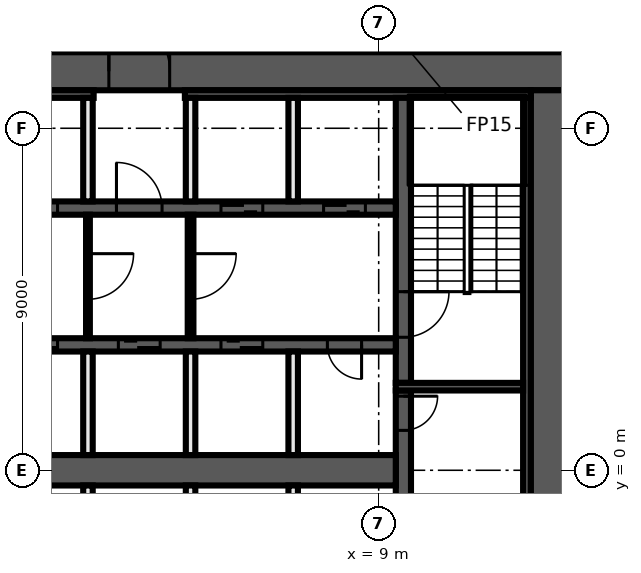
"""IFC4 building model, lengths in metres.
Left out: names, types, materials, properties, quantities, classifications, styles, units other than length and angle.
Written with IfcOpenShell. Run it as: python <this file> out.ifc"""

import sys

from ifc_helpers import new_model, si_unit, direction, frame, frame_2d, origin, place, context, subcontext, project, spatial, rectangle, extrude, element, fill, save


model = new_model("IFC4")
c1 = context("Model", 3, precision=1e-05, world=origin(), true_north=direction((0.0, 1.0)))
c2 = subcontext(c1, "Body", "Model", "MODEL_VIEW")
j1 = project(units=[si_unit("LENGTHUNIT", "METRE"), si_unit("PLANEANGLEUNIT", "RADIAN")], contexts=[c1])
p1 = place(None, origin())
s1 = spatial("IfcSite", under=j1, at=p1, CompositionType="ELEMENT")
p2 = place(p1, origin())
s2 = spatial("IfcBuilding", under=s1, at=p2, CompositionType="ELEMENT")
p3 = place(p2, frame((0.0, 0.0, 106.3)))
s3 = spatial("IfcBuildingStorey", under=s2, at=p3, CompositionType="ELEMENT", Elevation=106.3)
p4 = place(p3, frame((-14.0, 10.5, 0.0), z_axis=(0.0, 0.0, 1.0), x_axis=(1.0, 0.0, 0.0)))
e1 = element("IfcWall", 1, at=p4, inside=s3, PredefinedType="SHEAR", context=c2, shape_type="SweptSolid", body=[
    extrude(rectangle(XDim=28.0, YDim=1.0, at=frame_2d((14.0, 0.0))), origin(), (0.0, 0.0, 1.0), 3.3),
])
p5 = place(p4, frame((15.9, 0.0, 0.0)))
e2 = element("IfcOpeningElement", 2, at=p5, cuts=e1, PredefinedType="OPENING", context=c2, shape_type="SweptSolid", body=[
    extrude(rectangle(XDim=1.6, YDim=2.1, at=frame_2d((0.8, 1.05))), frame((0.0, 0.51, 0.0), z_axis=(0.0, -1.0, 0.0), x_axis=(1.0, 0.0, 0.0)), (0.0, 0.0, 1.0), 1.02),
])
p6 = place(p3, frame((13.5, 10.0, 0.0), z_axis=(0.0, 0.0, 1.0), x_axis=(0.0, -1.0, 0.0)))
e3 = element("IfcWall", 3, at=p6, inside=s3, PredefinedType="SHEAR", context=c2, shape_type="SweptSolid", body=[
    extrude(rectangle(XDim=20.0, YDim=1.0, at=frame_2d((10.0, 0.0))), origin(), (0.0, 0.0, 1.0), 3.3),
])
p7 = place(p3, frame((-13.0, 9.9, 0.0), z_axis=(0.0, 0.0, 1.0), x_axis=(1.0, 0.0, 0.0)))
e4 = element("IfcWall", 4, at=p7, inside=s3, PredefinedType="SHEAR", context=c2, shape_type="SweptSolid", body=[
    extrude(rectangle(XDim=14.5, YDim=0.2, at=frame_2d((7.25, 0.0))), origin(), (0.0, 0.0, 1.0), 3.3),
])
p8 = place(p3, frame((3.9, 9.9, 0.0), z_axis=(0.0, 0.0, 1.0), x_axis=(1.0, 0.0, 0.0)))
e5 = element("IfcWall", 5, at=p8, inside=s3, PredefinedType="SHEAR", context=c2, shape_type="SweptSolid", body=[
    extrude(rectangle(XDim=9.1, YDim=0.2, at=frame_2d((4.55, 0.0))), origin(), (0.0, 0.0, 1.0), 3.3),
])
p9 = place(p3, frame((12.9, 9.8, 0.0), z_axis=(0.0, 0.0, 1.0), x_axis=(0.0, -1.0, 0.0)))
e6 = element("IfcWall", 6, at=p9, inside=s3, PredefinedType="SHEAR", context=c2, shape_type="SweptSolid", body=[
    extrude(rectangle(XDim=19.6, YDim=0.2, at=frame_2d((9.8, 0.0))), origin(), (0.0, 0.0, 1.0), 3.3),
])
p10 = place(p3, frame((9.65, 2.1, 0.0), z_axis=(0.0, 0.0, 1.0), x_axis=(0.0, -1.0, 0.0)))
e7 = element("IfcWall", 7, at=p10, inside=s3, PredefinedType="SHEAR", context=c2, shape_type="SweptSolid", body=[
    extrude(rectangle(XDim=4.2, YDim=0.4, at=frame_2d((2.1, 0.0))), origin(), (0.0, 0.0, 1.0), 3.3),
])
p11 = place(p10, frame((0.15, 0.0, 0.0)))
e8 = element("IfcOpeningElement", 8, at=p11, cuts=e7, PredefinedType="OPENING", context=c2, shape_type="SweptSolid", body=[
    extrude(rectangle(XDim=0.9, YDim=2.1, at=frame_2d((0.45, 1.05))), frame((0.0, 0.21, 0.0), z_axis=(0.0, -1.0, 0.0), x_axis=(1.0, 0.0, 0.0)), (0.0, 0.0, 1.0), 0.42),
])
p12 = place(p3, frame((9.65, 9.8, 0.0), z_axis=(0.0, 0.0, 1.0), x_axis=(0.0, -1.0, 0.0)))
e9 = element("IfcWall", 9, at=p12, inside=s3, PredefinedType="SHEAR", context=c2, shape_type="SweptSolid", body=[
    extrude(rectangle(XDim=7.5, YDim=0.4, at=frame_2d((3.75, 0.0))), origin(), (0.0, 0.0, 1.0), 3.3),
])
p13 = place(p12, frame((5.1, 0.0, 0.0)))
e10 = element("IfcOpeningElement", 10, at=p13, cuts=e9, PredefinedType="OPENING", context=c2, shape_type="SweptSolid", body=[
    extrude(rectangle(XDim=1.2, YDim=2.1, at=frame_2d((0.6, 1.05))), frame((0.0, 0.21, 0.0), z_axis=(0.0, -1.0, 0.0), x_axis=(1.0, 0.0, 0.0)), (0.0, 0.0, 1.0), 0.42),
])
p14 = place(p3, frame((9.45, 2.2, 0.0), z_axis=(0.0, 0.0, 1.0), x_axis=(1.0, 0.0, 0.0)))
e11 = element("IfcWall", 11, at=p14, inside=s3, PredefinedType="SHEAR", context=c2, shape_type="SweptSolid", body=[
    extrude(rectangle(XDim=3.35, YDim=0.2, at=frame_2d((1.675, 0.0))), origin(), (0.0, 0.0, 1.0), 3.3),
])
p15 = place(p3, frame((-9.45, 6.9, 0.0), z_axis=(0.0, 0.0, 1.0), x_axis=(1.0, 0.0, 0.0)))
e12 = element("IfcWall", 12, at=p15, inside=s3, PredefinedType="SHEAR", context=c2, shape_type="SweptSolid", body=[
    extrude(rectangle(XDim=18.9, YDim=0.35, at=frame_2d((9.45, 0.0))), origin(), (0.0, 0.0, 1.0), 3.3),
])
p16 = place(p15, frame((0.8, 0.0, 0.0)))
e13 = element("IfcOpeningElement", 13, at=p16, cuts=e12, PredefinedType="OPENING", context=c2, shape_type="SweptSolid", body=[
    extrude(rectangle(XDim=1.1, YDim=2.1, at=frame_2d((0.55, 1.05))), frame((0.0, 0.185, 0.0), z_axis=(0.0, -1.0, 0.0), x_axis=(1.0, 0.0, 0.0)), (0.0, 0.0, 1.0), 0.37),
])
p17 = place(p15, frame((3.5, 0.0, 0.0)))
e14 = element("IfcOpeningElement", 14, at=p17, cuts=e12, PredefinedType="OPENING", context=c2, shape_type="SweptSolid", body=[
    extrude(rectangle(XDim=1.1, YDim=2.1, at=frame_2d((0.55, 1.05))), frame((0.0, 0.185, 0.0), z_axis=(0.0, -1.0, 0.0), x_axis=(1.0, 0.0, 0.0)), (0.0, 0.0, 1.0), 0.37),
])
p18 = place(p15, frame((6.2, 0.0, 0.0)))
e15 = element("IfcOpeningElement", 15, at=p18, cuts=e12, PredefinedType="OPENING", context=c2, shape_type="SweptSolid", body=[
    extrude(rectangle(XDim=1.1, YDim=2.1, at=frame_2d((0.55, 1.05))), frame((0.0, 0.185, 0.0), z_axis=(0.0, -1.0, 0.0), x_axis=(1.0, 0.0, 0.0)), (0.0, 0.0, 1.0), 0.37),
])
p19 = place(p15, frame((8.9, 0.0, 0.0)))
e16 = element("IfcOpeningElement", 16, at=p19, cuts=e12, PredefinedType="OPENING", context=c2, shape_type="SweptSolid", body=[
    extrude(rectangle(XDim=1.1, YDim=2.1, at=frame_2d((0.55, 1.05))), frame((0.0, 0.185, 0.0), z_axis=(0.0, -1.0, 0.0), x_axis=(1.0, 0.0, 0.0)), (0.0, 0.0, 1.0), 0.37),
])
p20 = place(p15, frame((11.55, 0.0, 0.0)))
e17 = element("IfcOpeningElement", 17, at=p20, cuts=e12, PredefinedType="OPENING", context=c2, shape_type="SweptSolid", body=[
    extrude(rectangle(XDim=1.2, YDim=2.1, at=frame_2d((0.6, 1.05))), frame((0.0, 0.185, 0.0), z_axis=(0.0, -1.0, 0.0), x_axis=(1.0, 0.0, 0.0)), (0.0, 0.0, 1.0), 0.37),
])
p21 = place(p15, frame((14.3, 0.0, 0.0)))
e18 = element("IfcOpeningElement", 18, at=p21, cuts=e12, PredefinedType="OPENING", context=c2, shape_type="SweptSolid", body=[
    extrude(rectangle(XDim=1.1, YDim=2.1, at=frame_2d((0.55, 1.05))), frame((0.0, 0.185, 0.0), z_axis=(0.0, -1.0, 0.0), x_axis=(1.0, 0.0, 0.0)), (0.0, 0.0, 1.0), 0.37),
])
p22 = place(p15, frame((17.0, 0.0, 0.0)))
e19 = element("IfcOpeningElement", 19, at=p22, cuts=e12, PredefinedType="OPENING", context=c2, shape_type="SweptSolid", body=[
    extrude(rectangle(XDim=1.1, YDim=2.1, at=frame_2d((0.55, 1.05))), frame((0.0, 0.185, 0.0), z_axis=(0.0, -1.0, 0.0), x_axis=(1.0, 0.0, 0.0)), (0.0, 0.0, 1.0), 0.37),
])
p23 = place(p3, frame((9.45, 3.3, 0.0), z_axis=(0.0, 0.0, 1.0), x_axis=(-1.0, 0.0, 0.0)))
e20 = element("IfcWall", 20, at=p23, inside=s3, PredefinedType="SHEAR", context=c2, shape_type="SweptSolid", body=[
    extrude(rectangle(XDim=18.9, YDim=0.35, at=frame_2d((9.45, 0.0))), origin(), (0.0, 0.0, 1.0), 3.3),
])
p24 = place(p23, frame((17.0, 0.0, 0.0)))
e21 = element("IfcOpeningElement", 21, at=p24, cuts=e20, PredefinedType="OPENING", context=c2, shape_type="SweptSolid", body=[
    extrude(rectangle(XDim=1.1, YDim=2.1, at=frame_2d((0.55, 1.05))), frame((0.0, 0.185, 0.0), z_axis=(0.0, -1.0, 0.0), x_axis=(1.0, 0.0, 0.0)), (0.0, 0.0, 1.0), 0.37),
])
p25 = place(p23, frame((14.3, 0.0, 0.0)))
e22 = element("IfcOpeningElement", 22, at=p25, cuts=e20, PredefinedType="OPENING", context=c2, shape_type="SweptSolid", body=[
    extrude(rectangle(XDim=1.1, YDim=2.1, at=frame_2d((0.55, 1.05))), frame((0.0, 0.185, 0.0), z_axis=(0.0, -1.0, 0.0), x_axis=(1.0, 0.0, 0.0)), (0.0, 0.0, 1.0), 0.37),
])
p26 = place(p23, frame((11.6, 0.0, 0.0)))
e23 = element("IfcOpeningElement", 23, at=p26, cuts=e20, PredefinedType="OPENING", context=c2, shape_type="SweptSolid", body=[
    extrude(rectangle(XDim=1.1, YDim=2.1, at=frame_2d((0.55, 1.05))), frame((0.0, 0.185, 0.0), z_axis=(0.0, -1.0, 0.0), x_axis=(1.0, 0.0, 0.0)), (0.0, 0.0, 1.0), 0.37),
])
p27 = place(p23, frame((8.9, 0.0, 0.0)))
e24 = element("IfcOpeningElement", 24, at=p27, cuts=e20, PredefinedType="OPENING", context=c2, shape_type="SweptSolid", body=[
    extrude(rectangle(XDim=1.1, YDim=2.1, at=frame_2d((0.55, 1.05))), frame((0.0, 0.185, 0.0), z_axis=(0.0, -1.0, 0.0), x_axis=(1.0, 0.0, 0.0)), (0.0, 0.0, 1.0), 0.37),
])
p28 = place(p23, frame((6.2, 0.0, 0.0)))
e25 = element("IfcOpeningElement", 25, at=p28, cuts=e20, PredefinedType="OPENING", context=c2, shape_type="SweptSolid", body=[
    extrude(rectangle(XDim=1.1, YDim=2.1, at=frame_2d((0.55, 1.05))), frame((0.0, 0.185, 0.0), z_axis=(0.0, -1.0, 0.0), x_axis=(1.0, 0.0, 0.0)), (0.0, 0.0, 1.0), 0.37),
])
p29 = place(p23, frame((3.5, 0.0, 0.0)))
e26 = element("IfcOpeningElement", 26, at=p29, cuts=e20, PredefinedType="OPENING", context=c2, shape_type="SweptSolid", body=[
    extrude(rectangle(XDim=1.1, YDim=2.1, at=frame_2d((0.55, 1.05))), frame((0.0, 0.185, 0.0), z_axis=(0.0, -1.0, 0.0), x_axis=(1.0, 0.0, 0.0)), (0.0, 0.0, 1.0), 0.37),
])
p30 = place(p23, frame((0.9, 0.0, 0.0)))
e27 = element("IfcOpeningElement", 27, at=p30, cuts=e20, PredefinedType="OPENING", context=c2, shape_type="SweptSolid", body=[
    extrude(rectangle(XDim=0.9, YDim=2.1, at=frame_2d((0.45, 1.05))), frame((0.0, 0.185, 0.0), z_axis=(0.0, -1.0, 0.0), x_axis=(1.0, 0.0, 0.0)), (0.0, 0.0, 1.0), 0.37),
])
p31 = place(p3, frame((-9.45, 0.0, 0.0), z_axis=(0.0, 0.0, 1.0), x_axis=(1.0, 0.0, 0.0)))
e28 = element("IfcWall", 28, at=p31, inside=s3, PredefinedType="SHEAR", context=c2, shape_type="SweptSolid", body=[
    extrude(rectangle(XDim=18.9, YDim=0.8, at=frame_2d((9.45, 0.0))), origin(), (0.0, 0.0, 1.0), 3.3),
])
for number, where, z_axis, x_axis in (
    (29, (6.75, -3.125, 0.0), (0.0, 0.0, 1.0), (0.0, 1.0, 0.0)),
    (30, (6.75, 0.4, 0.0), (0.0, 0.0, 1.0), (0.0, 1.0, 0.0)),
    (31, (6.75, 7.075, 0.0), (0.0, 0.0, 1.0), (0.0, 1.0, 0.0)),
):
    element("IfcWall", number, at=place(p3, frame(where, z_axis=z_axis, x_axis=x_axis)), inside=s3, PredefinedType="SOLIDWALL", context=c2, shape_type="SweptSolid", body=[
        extrude(rectangle(XDim=2.725, YDim=0.25, at=frame_2d((1.363, 0.0))), origin(), (0.0, 0.0, 1.0), 3.3),
    ])
p32 = place(p3, frame((4.05, 6.725, 0.0), z_axis=(0.0, 0.0, 1.0), x_axis=(0.0, -1.0, 0.0)))
e32 = element("IfcWall", 32, at=p32, inside=s3, PredefinedType="PARTITIONING", context=c2, shape_type="SweptSolid", body=[
    extrude(rectangle(XDim=3.25, YDim=0.15, at=frame_2d((1.625, 0.0))), origin(), (0.0, 0.0, 1.0), 3.3),
])
p33 = place(p32, frame((1.025, 0.0, 0.0)))
e33 = element("IfcOpeningElement", 33, at=p33, cuts=e32, PredefinedType="OPENING", context=c2, shape_type="SweptSolid", body=[
    extrude(rectangle(XDim=1.2, YDim=2.1, at=frame_2d((0.6, 1.05))), frame((0.0, 0.085, 0.0), z_axis=(0.0, -1.0, 0.0), x_axis=(1.0, 0.0, 0.0)), (0.0, 0.0, 1.0), 0.17),
])
for number, where, z_axis, x_axis in (
    (34, (4.05, -3.125, 0.0), (0.0, 0.0, 1.0), (0.0, 1.0, 0.0)),
    (35, (4.05, 0.4, 0.0), (0.0, 0.0, 1.0), (0.0, 1.0, 0.0)),
    (36, (4.05, 7.075, 0.0), (0.0, 0.0, 1.0), (0.0, 1.0, 0.0)),
):
    element("IfcWall", number, at=place(p3, frame(where, z_axis=z_axis, x_axis=x_axis)), inside=s3, PredefinedType="SOLIDWALL", context=c2, shape_type="SweptSolid", body=[
        extrude(rectangle(XDim=2.725, YDim=0.25, at=frame_2d((1.363, 0.0))), origin(), (0.0, 0.0, 1.0), 3.3),
    ])
p34 = place(p3, frame((1.35, 6.725, 0.0), z_axis=(0.0, 0.0, 1.0), x_axis=(0.0, -1.0, 0.0)))
e37 = element("IfcWall", 37, at=p34, inside=s3, PredefinedType="PARTITIONING", context=c2, shape_type="SweptSolid", body=[
    extrude(rectangle(XDim=3.25, YDim=0.1, at=frame_2d((1.625, 0.0))), origin(), (0.0, 0.0, 1.0), 3.3),
])
p35 = place(p34, frame((1.025, 0.0, 0.0)))
e38 = element("IfcOpeningElement", 38, at=p35, cuts=e37, PredefinedType="OPENING", context=c2, shape_type="SweptSolid", body=[
    extrude(rectangle(XDim=1.2, YDim=2.1, at=frame_2d((0.6, 1.05))), frame((0.0, 0.06, 0.0), z_axis=(0.0, -1.0, 0.0), x_axis=(1.0, 0.0, 0.0)), (0.0, 0.0, 1.0), 0.12),
])
for number, where, z_axis, x_axis in (
    (39, (1.35, -3.125, 0.0), (0.0, 0.0, 1.0), (0.0, 1.0, 0.0)),
    (40, (1.35, 0.4, 0.0), (0.0, 0.0, 1.0), (0.0, 1.0, 0.0)),
    (41, (1.35, 7.075, 0.0), (0.0, 0.0, 1.0), (0.0, 1.0, 0.0)),
):
    element("IfcWall", number, at=place(p3, frame(where, z_axis=z_axis, x_axis=x_axis)), inside=s3, PredefinedType="SOLIDWALL", context=c2, shape_type="SweptSolid", body=[
        extrude(rectangle(XDim=2.725, YDim=0.25, at=frame_2d((1.363, 0.0))), origin(), (0.0, 0.0, 1.0), 3.3),
    ])
p36 = place(p11, origin())
e42 = element("IfcDoor", 42, at=p36, inside=s3, OperationType="SINGLE_SWING_RIGHT", PredefinedType="DOOR", context=c2, shape_type="SweptSolid", body=[
    extrude(rectangle(XDim=0.9, YDim=2.1, at=frame_2d((0.45, 1.05))), frame((0.0, 0.025, 0.0), z_axis=(0.0, -1.0, 0.0), x_axis=(1.0, 0.0, 0.0)), (0.0, 0.0, 1.0), 0.05),
])
fill(e8, e42)
p37 = place(p19, origin())
e43 = element("IfcDoor", 43, at=p37, inside=s3, OperationType="DOUBLE_DOOR_SLIDING", PredefinedType="DOOR", context=c2, shape_type="SweptSolid", body=[
    extrude(rectangle(XDim=1.1, YDim=2.1, at=frame_2d((0.55, 1.05))), frame((0.0, 0.025, 0.0), z_axis=(0.0, -1.0, 0.0), x_axis=(1.0, 0.0, 0.0)), (0.0, 0.0, 1.0), 0.05),
])
fill(e16, e43)
p38 = place(p5, origin())
e44 = element("IfcDoor", 44, at=p38, inside=s3, OperationType="DOUBLE_DOOR_SINGLE_SWING", PredefinedType="DOOR", context=c2, shape_type="SweptSolid", body=[
    extrude(rectangle(XDim=1.6, YDim=2.1, at=frame_2d((0.8, 1.05))), frame((0.0, 0.025, 0.0), z_axis=(0.0, -1.0, 0.0), x_axis=(1.0, 0.0, 0.0)), (0.0, 0.0, 1.0), 0.05),
])
fill(e2, e44)
p39 = place(p20, origin())
e45 = element("IfcDoor", 45, at=p39, inside=s3, OperationType="SINGLE_SWING_LEFT", PredefinedType="DOOR", context=c2, shape_type="SweptSolid", body=[
    extrude(rectangle(XDim=1.2, YDim=2.1, at=frame_2d((0.6, 1.05))), frame((0.0, 0.025, 0.0), z_axis=(0.0, -1.0, 0.0), x_axis=(1.0, 0.0, 0.0)), (0.0, 0.0, 1.0), 0.05),
])
fill(e17, e45)
p40 = place(p21, origin())
e46 = element("IfcDoor", 46, at=p40, inside=s3, OperationType="DOUBLE_DOOR_SLIDING", PredefinedType="DOOR", context=c2, shape_type="SweptSolid", body=[
    extrude(rectangle(XDim=1.1, YDim=2.1, at=frame_2d((0.55, 1.05))), frame((0.0, 0.025, 0.0), z_axis=(0.0, -1.0, 0.0), x_axis=(1.0, 0.0, 0.0)), (0.0, 0.0, 1.0), 0.05),
])
fill(e18, e46)
p41 = place(p22, origin())
e47 = element("IfcDoor", 47, at=p41, inside=s3, OperationType="DOUBLE_DOOR_SLIDING", PredefinedType="DOOR", context=c2, shape_type="SweptSolid", body=[
    extrude(rectangle(XDim=1.1, YDim=2.1, at=frame_2d((0.55, 1.05))), frame((0.0, 0.025, 0.0), z_axis=(0.0, -1.0, 0.0), x_axis=(1.0, 0.0, 0.0)), (0.0, 0.0, 1.0), 0.05),
])
fill(e19, e47)
p42 = place(p27, origin())
e48 = element("IfcDoor", 48, at=p42, inside=s3, OperationType="DOUBLE_DOOR_SLIDING", PredefinedType="DOOR", context=c2, shape_type="SweptSolid", body=[
    extrude(rectangle(XDim=1.1, YDim=2.1, at=frame_2d((0.55, 1.05))), frame((0.0, 0.025, 0.0), z_axis=(0.0, -1.0, 0.0), x_axis=(1.0, 0.0, 0.0)), (0.0, 0.0, 1.0), 0.05),
])
fill(e24, e48)
p43 = place(p28, origin())
e49 = element("IfcDoor", 49, at=p43, inside=s3, OperationType="DOUBLE_DOOR_SLIDING", PredefinedType="DOOR", context=c2, shape_type="SweptSolid", body=[
    extrude(rectangle(XDim=1.1, YDim=2.1, at=frame_2d((0.55, 1.05))), frame((0.0, 0.025, 0.0), z_axis=(0.0, -1.0, 0.0), x_axis=(1.0, 0.0, 0.0)), (0.0, 0.0, 1.0), 0.05),
])
fill(e25, e49)
p44 = place(p29, origin())
e50 = element("IfcDoor", 50, at=p44, inside=s3, OperationType="DOUBLE_DOOR_SLIDING", PredefinedType="DOOR", context=c2, shape_type="SweptSolid", body=[
    extrude(rectangle(XDim=1.1, YDim=2.1, at=frame_2d((0.55, 1.05))), frame((0.0, 0.025, 0.0), z_axis=(0.0, -1.0, 0.0), x_axis=(1.0, 0.0, 0.0)), (0.0, 0.0, 1.0), 0.05),
])
fill(e26, e50)
p45 = place(p30, origin())
e51 = element("IfcDoor", 51, at=p45, inside=s3, OperationType="SINGLE_SWING_LEFT", PredefinedType="DOOR", context=c2, shape_type="SweptSolid", body=[
    extrude(rectangle(XDim=0.9, YDim=2.1, at=frame_2d((0.45, 1.05))), frame((0.0, 0.025, 0.0), z_axis=(0.0, -1.0, 0.0), x_axis=(1.0, 0.0, 0.0)), (0.0, 0.0, 1.0), 0.05),
])
fill(e27, e51)
p46 = place(p13, origin())
e52 = element("IfcDoor", 52, at=p46, inside=s3, OperationType="SINGLE_SWING_LEFT", PredefinedType="DOOR", context=c2, shape_type="SweptSolid", body=[
    extrude(rectangle(XDim=1.2, YDim=2.1, at=frame_2d((0.6, 1.05))), frame((0.0, 0.025, 0.0), z_axis=(0.0, -1.0, 0.0), x_axis=(1.0, 0.0, 0.0)), (0.0, 0.0, 1.0), 0.05),
])
fill(e10, e52)
p47 = place(p35, origin())
e53 = element("IfcDoor", 53, at=p47, inside=s3, OperationType="SINGLE_SWING_LEFT", PredefinedType="DOOR", context=c2, shape_type="SweptSolid", body=[
    extrude(rectangle(XDim=1.2, YDim=2.1, at=frame_2d((0.6, 1.05))), frame((0.0, 0.025, 0.0), z_axis=(0.0, -1.0, 0.0), x_axis=(1.0, 0.0, 0.0)), (0.0, 0.0, 1.0), 0.05),
])
fill(e38, e53)
p48 = place(p33, origin())
e54 = element("IfcDoor", 54, at=p48, inside=s3, OperationType="SINGLE_SWING_RIGHT", PredefinedType="DOOR", context=c2, shape_type="SweptSolid", body=[
    extrude(rectangle(XDim=1.2, YDim=2.1, at=frame_2d((0.6, 1.05))), frame((0.0, 0.025, 0.0), z_axis=(0.0, -1.0, 0.0), x_axis=(1.0, 0.0, 0.0)), (0.0, 0.0, 1.0), 0.05),
])
fill(e33, e54)
save(model, sys.argv[1])
